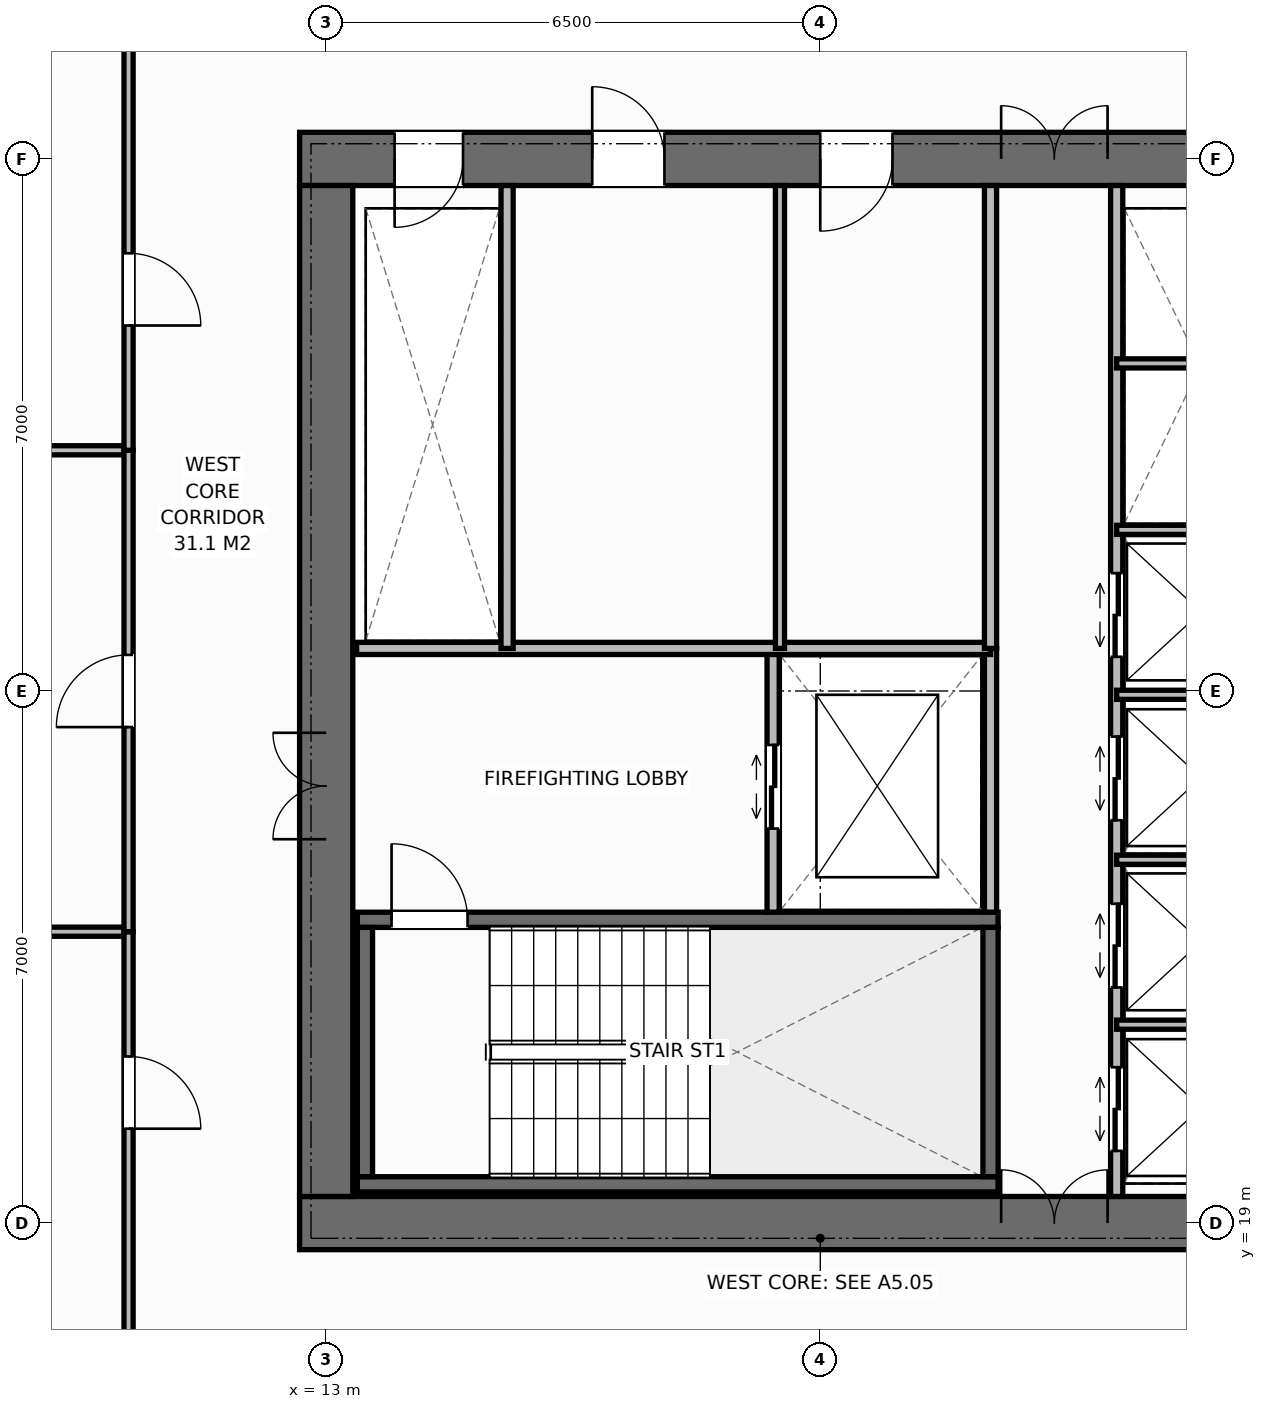
"""IFC4 building model, lengths in metres.
Left out: names, types, materials, properties, quantities, classifications, styles, units other than length and angle.
Written with IfcOpenShell. Run it as: python <this file> out.ifc"""

import sys

from ifc_helpers import new_model, si_unit, direction, frame, frame_2d, origin, place, context, subcontext, project, spatial, rectangle, extrude, element, fill, save


model = new_model("IFC4")
c1 = context("Model", 3, precision=1e-05, world=origin(), true_north=direction((0.0, 1.0)))
c2 = subcontext(c1, "Body", "Model", "MODEL_VIEW")
j1 = project(units=[si_unit("LENGTHUNIT", "METRE"), si_unit("PLANEANGLEUNIT", "RADIAN")], contexts=[c1])
p1 = place(None, origin())
s1 = spatial("IfcSite", under=j1, at=p1, CompositionType="ELEMENT")
p2 = place(p1, origin())
s2 = spatial("IfcBuilding", under=s1, at=p2, CompositionType="ELEMENT")
p3 = place(p2, frame((0.0, 0.0, 86.0)))
s3 = spatial("IfcBuildingStorey", under=s2, at=p3, CompositionType="ELEMENT", Elevation=86.0)
p4 = place(p3, frame((12.65, 19.0, 0.0), z_axis=(0.0, 0.0, 1.0), x_axis=(1.0, 0.0, 0.0)))
e1 = element("IfcWall", 1, at=p4, inside=s3, PredefinedType="SHEAR", context=c2, shape_type="SweptSolid", body=[
    extrude(rectangle(XDim=13.7, YDim=0.7, at=frame_2d((6.85, 0.0))), origin(), (0.0, 0.0, 1.0), 3.8),
])
p5 = place(p4, frame((9.23, 0.0, 0.0)))
e2 = element("IfcOpeningElement", 2, at=p5, cuts=e1, PredefinedType="OPENING", context=c2, shape_type="SweptSolid", body=[
    extrude(rectangle(XDim=1.4, YDim=2.2, at=frame_2d((0.7, 1.1))), frame((0.0, 0.36, 0.0), z_axis=(0.0, -1.0, 0.0), x_axis=(1.0, 0.0, 0.0)), (0.0, 0.0, 1.0), 0.72),
])
p6 = place(p3, frame((12.65, 33.0, 0.0), z_axis=(0.0, 0.0, 1.0), x_axis=(1.0, 0.0, 0.0)))
e3 = element("IfcWall", 3, at=p6, inside=s3, PredefinedType="SHEAR", context=c2, shape_type="SweptSolid", body=[
    extrude(rectangle(XDim=13.7, YDim=0.7, at=frame_2d((6.85, 0.0))), origin(), (0.0, 0.0, 1.0), 3.8),
])
p7 = place(p6, frame((1.25, 0.0, 0.0)))
e4 = element("IfcOpeningElement", 4, at=p7, cuts=e3, PredefinedType="OPENING", context=c2, shape_type="SweptSolid", body=[
    extrude(rectangle(XDim=0.9, YDim=2.15, at=frame_2d((0.45, 1.075))), frame((0.0, 0.36, 0.0), z_axis=(0.0, -1.0, 0.0), x_axis=(1.0, 0.0, 0.0)), (0.0, 0.0, 1.0), 0.72),
])
p8 = place(p6, frame((3.85, 0.0, 0.0)))
e5 = element("IfcOpeningElement", 5, at=p8, cuts=e3, PredefinedType="OPENING", context=c2, shape_type="SweptSolid", body=[
    extrude(rectangle(XDim=0.95, YDim=2.15, at=frame_2d((0.475, 1.075))), frame((0.0, 0.36, 0.0), z_axis=(0.0, -1.0, 0.0), x_axis=(1.0, 0.0, 0.0)), (0.0, 0.0, 1.0), 0.72),
])
p9 = place(p6, frame((6.85, 0.0, 0.0)))
e6 = element("IfcOpeningElement", 6, at=p9, cuts=e3, PredefinedType="OPENING", context=c2, shape_type="SweptSolid", body=[
    extrude(rectangle(XDim=0.95, YDim=2.15, at=frame_2d((0.475, 1.075))), frame((0.0, 0.36, 0.0), z_axis=(0.0, -1.0, 0.0), x_axis=(1.0, 0.0, 0.0)), (0.0, 0.0, 1.0), 0.72),
])
p10 = place(p6, frame((9.23, 0.0, 0.0)))
e7 = element("IfcOpeningElement", 7, at=p10, cuts=e3, PredefinedType="OPENING", context=c2, shape_type="SweptSolid", body=[
    extrude(rectangle(XDim=1.4, YDim=2.2, at=frame_2d((0.7, 1.1))), frame((0.0, 0.36, 0.0), z_axis=(0.0, -1.0, 0.0), x_axis=(1.0, 0.0, 0.0)), (0.0, 0.0, 1.0), 0.72),
])
p11 = place(p3, frame((13.0, 19.35, 0.0), z_axis=(0.0, 0.0, 1.0), x_axis=(0.0, 1.0, 0.0)))
e8 = element("IfcWall", 8, at=p11, inside=s3, PredefinedType="SHEAR", context=c2, shape_type="SweptSolid", body=[
    extrude(rectangle(XDim=13.3, YDim=0.7, at=frame_2d((6.65, 0.0))), origin(), (0.0, 0.0, 1.0), 3.8),
])
p12 = place(p11, frame((4.7, 0.0, 0.0)))
e9 = element("IfcOpeningElement", 9, at=p12, cuts=e8, PredefinedType="OPENING", context=c2, shape_type="SweptSolid", body=[
    extrude(rectangle(XDim=1.4, YDim=2.2, at=frame_2d((0.7, 1.1))), frame((0.0, 0.36, 0.0), z_axis=(0.0, -1.0, 0.0), x_axis=(1.0, 0.0, 0.0)), (0.0, 0.0, 1.0), 0.72),
])
p13 = place(p3, frame((13.41, 19.51, 0.0), z_axis=(0.0, 0.0, 1.0), x_axis=(1.0, 0.0, 0.0)))
e10 = element("IfcWall", 10, at=p13, inside=s3, PredefinedType="SHEAR", context=c2, shape_type="SweptSolid", body=[
    extrude(rectangle(XDim=8.43, YDim=0.2, at=frame_2d((4.215, 0.0))), origin(), (0.0, 0.0, 1.0), 3.8),
])
p14 = place(p3, frame((13.41, 22.99, 0.0), z_axis=(0.0, 0.0, 1.0), x_axis=(1.0, 0.0, 0.0)))
e11 = element("IfcWall", 11, at=p14, inside=s3, PredefinedType="SHEAR", context=c2, shape_type="SweptSolid", body=[
    extrude(rectangle(XDim=8.43, YDim=0.2, at=frame_2d((4.215, 0.0))), origin(), (0.0, 0.0, 1.0), 3.8),
])
p15 = place(p14, frame((0.45, 0.0, 0.0)))
e12 = element("IfcOpeningElement", 12, at=p15, cuts=e11, PredefinedType="OPENING", context=c2, shape_type="SweptSolid", body=[
    extrude(rectangle(XDim=1.0, YDim=2.15, at=frame_2d((0.5, 1.075))), frame((0.0, 0.11, 0.0), z_axis=(0.0, -1.0, 0.0), x_axis=(1.0, 0.0, 0.0)), (0.0, 0.0, 1.0), 0.22),
])
for number, where, z_axis, x_axis in (
    (13, (13.51, 19.61, 0.0), (0.0, 0.0, 1.0), (0.0, 1.0, 0.0)),
    (14, (21.74, 19.61, 0.0), (0.0, 0.0, 1.0), (0.0, 1.0, 0.0)),
):
    element("IfcWall", number, at=place(p3, frame(where, z_axis=z_axis, x_axis=x_axis)), inside=s3, PredefinedType="SHEAR", context=c2, shape_type="SweptSolid", body=[
        extrude(rectangle(XDim=3.28, YDim=0.2, at=frame_2d((1.64, 0.0))), origin(), (0.0, 0.0, 1.0), 3.8),
    ])
p16 = place(p3, frame((21.74, 23.09, 0.0), z_axis=(0.0, 0.0, 1.0), x_axis=(0.0, 1.0, 0.0)))
e15 = element("IfcWall", 15, at=p16, inside=s3, PredefinedType="STANDARD", context=c2, shape_type="SweptSolid", body=[
    extrude(rectangle(XDim=3.47, YDim=0.16, at=frame_2d((1.735, 0.0))), origin(), (0.0, 0.0, 1.0), 3.565),
])
p17 = place(p3, frame((18.88, 23.09, 0.0), z_axis=(0.0, 0.0, 1.0), x_axis=(0.0, 1.0, 0.0)))
e16 = element("IfcWall", 16, at=p17, inside=s3, PredefinedType="STANDARD", context=c2, shape_type="SweptSolid", body=[
    extrude(rectangle(XDim=3.47, YDim=0.16, at=frame_2d((1.735, 0.0))), origin(), (0.0, 0.0, 1.0), 3.565),
])
p18 = place(p17, frame((1.1, 0.0, 0.0)))
e17 = element("IfcOpeningElement", 17, at=p18, cuts=e16, PredefinedType="OPENING", context=c2, shape_type="SweptSolid", body=[
    extrude(rectangle(XDim=1.1, YDim=2.2, at=frame_2d((0.55, 1.1))), frame((0.0, 0.09, 0.0), z_axis=(0.0, -1.0, 0.0), x_axis=(1.0, 0.0, 0.0)), (0.0, 0.0, 1.0), 0.18),
])
p19 = place(p3, frame((13.4, 26.56, 0.0), z_axis=(0.0, 0.0, 1.0), x_axis=(1.0, 0.0, 0.0)))
e18 = element("IfcWall", 18, at=p19, inside=s3, PredefinedType="STANDARD", context=c2, shape_type="SweptSolid", body=[
    extrude(rectangle(XDim=8.34, YDim=0.16, at=frame_2d((4.17, 0.0))), origin(), (0.0, 0.0, 1.0), 3.565),
])
p20 = place(p3, frame((15.38, 26.56, 0.0), z_axis=(0.0, 0.0, 1.0), x_axis=(0.0, 1.0, 0.0)))
e19 = element("IfcWall", 19, at=p20, inside=s3, PredefinedType="STANDARD", context=c2, shape_type="SweptSolid", body=[
    extrude(rectangle(XDim=6.09, YDim=0.16, at=frame_2d((3.045, 0.0))), origin(), (0.0, 0.0, 1.0), 3.565),
])
p21 = place(p3, frame((18.97, 26.56, 0.0), z_axis=(0.0, 0.0, 1.0), x_axis=(0.0, 1.0, 0.0)))
e20 = element("IfcWall", 20, at=p21, inside=s3, PredefinedType="PARTITIONING", context=c2, shape_type="SweptSolid", body=[
    extrude(rectangle(XDim=6.09, YDim=0.12, at=frame_2d((3.045, 0.0))), origin(), (0.0, 0.0, 1.0), 3.565),
])
p22 = place(p3, frame((21.74, 26.56, 0.0), z_axis=(0.0, 0.0, 1.0), x_axis=(0.0, 1.0, 0.0)))
e21 = element("IfcWall", 21, at=p22, inside=s3, PredefinedType="STANDARD", context=c2, shape_type="SweptSolid", body=[
    extrude(rectangle(XDim=6.09, YDim=0.16, at=frame_2d((3.045, 0.0))), origin(), (0.0, 0.0, 1.0), 3.565),
])
p23 = place(p3, frame((23.4, 19.35, 0.0), z_axis=(0.0, 0.0, 1.0), x_axis=(0.0, 1.0, 0.0)))
e22 = element("IfcWall", 22, at=p23, inside=s3, PredefinedType="STANDARD", context=c2, shape_type="SweptSolid", body=[
    extrude(rectangle(XDim=13.3, YDim=0.16, at=frame_2d((6.65, 0.0))), origin(), (0.0, 0.0, 1.0), 3.565),
])
p24 = place(p23, frame((0.6, 0.0, 0.0)))
e23 = element("IfcOpeningElement", 23, at=p24, cuts=e22, PredefinedType="OPENING", context=c2, shape_type="SweptSolid", body=[
    extrude(rectangle(XDim=1.1, YDim=2.2, at=frame_2d((0.55, 1.1))), frame((0.0, 0.09, 0.0), z_axis=(0.0, -1.0, 0.0), x_axis=(1.0, 0.0, 0.0)), (0.0, 0.0, 1.0), 0.18),
])
p25 = place(p23, frame((2.75, 0.0, 0.0)))
e24 = element("IfcOpeningElement", 24, at=p25, cuts=e22, PredefinedType="OPENING", context=c2, shape_type="SweptSolid", body=[
    extrude(rectangle(XDim=1.1, YDim=2.2, at=frame_2d((0.55, 1.1))), frame((0.0, 0.09, 0.0), z_axis=(0.0, -1.0, 0.0), x_axis=(1.0, 0.0, 0.0)), (0.0, 0.0, 1.0), 0.18),
])
p26 = place(p23, frame((4.95, 0.0, 0.0)))
e25 = element("IfcOpeningElement", 25, at=p26, cuts=e22, PredefinedType="OPENING", context=c2, shape_type="SweptSolid", body=[
    extrude(rectangle(XDim=1.1, YDim=2.2, at=frame_2d((0.55, 1.1))), frame((0.0, 0.09, 0.0), z_axis=(0.0, -1.0, 0.0), x_axis=(1.0, 0.0, 0.0)), (0.0, 0.0, 1.0), 0.18),
])
p27 = place(p23, frame((7.1, 0.0, 0.0)))
e26 = element("IfcOpeningElement", 26, at=p27, cuts=e22, PredefinedType="OPENING", context=c2, shape_type="SweptSolid", body=[
    extrude(rectangle(XDim=1.1, YDim=2.2, at=frame_2d((0.55, 1.1))), frame((0.0, 0.09, 0.0), z_axis=(0.0, -1.0, 0.0), x_axis=(1.0, 0.0, 0.0)), (0.0, 0.0, 1.0), 0.18),
])
for number, where, z_axis, x_axis in (
    (27, (23.4, 21.61, 0.0), (0.0, 0.0, 1.0), (1.0, 0.0, 0.0)),
    (28, (23.4, 23.78, 0.0), (0.0, 0.0, 1.0), (1.0, 0.0, 0.0)),
    (29, (23.4, 25.95, 0.0), (0.0, 0.0, 1.0), (1.0, 0.0, 0.0)),
    (30, (23.4, 28.12, 0.0), (0.0, 0.0, 1.0), (1.0, 0.0, 0.0)),
    (31, (23.4, 30.31, 0.0), (0.0, 0.0, 1.0), (1.0, 0.0, 0.0)),
):
    element("IfcWall", number, at=place(p3, frame(where, z_axis=z_axis, x_axis=x_axis)), inside=s3, PredefinedType="PARTITIONING", context=c2, shape_type="SweptSolid", body=[
        extrude(rectangle(XDim=2.2, YDim=0.12, at=frame_2d((1.1, 0.0))), origin(), (0.0, 0.0, 1.0), 3.565),
    ])
p28 = place(p3, frame((1.82, 22.833, 0.0), z_axis=(0.0, 0.0, 1.0), x_axis=(1.0, 0.0, 0.0)))
e32 = element("IfcWall", 32, at=p28, inside=s3, PredefinedType="PARTITIONING", context=c2, shape_type="SweptSolid", body=[
    extrude(rectangle(XDim=8.58, YDim=0.12, at=frame_2d((4.29, 0.0))), origin(), (0.0, 0.0, 1.0), 3.565),
])
p29 = place(p3, frame((10.4, 16.5, 0.0), z_axis=(0.0, 0.0, 1.0), x_axis=(0.0, 1.0, 0.0)))
e33 = element("IfcWall", 33, at=p29, inside=s3, PredefinedType="PARTITIONING", context=c2, shape_type="SweptSolid", body=[
    extrude(rectangle(XDim=6.333, YDim=0.12, at=frame_2d((3.167, 0.0))), origin(), (0.0, 0.0, 1.0), 3.565),
])
p30 = place(p29, frame((3.742, 0.0, 0.0)))
e34 = element("IfcOpeningElement", 34, at=p30, cuts=e33, PredefinedType="OPENING", context=c2, shape_type="SweptSolid", body=[
    extrude(rectangle(XDim=0.95, YDim=2.15, at=frame_2d((0.475, 1.075))), frame((0.0, 0.07, 0.0), z_axis=(0.0, -1.0, 0.0), x_axis=(1.0, 0.0, 0.0)), (0.0, 0.0, 1.0), 0.14),
])
p31 = place(p3, frame((1.82, 29.167, 0.0), z_axis=(0.0, 0.0, 1.0), x_axis=(1.0, 0.0, 0.0)))
e35 = element("IfcWall", 35, at=p31, inside=s3, PredefinedType="PARTITIONING", context=c2, shape_type="SweptSolid", body=[
    extrude(rectangle(XDim=8.58, YDim=0.12, at=frame_2d((4.29, 0.0))), origin(), (0.0, 0.0, 1.0), 3.565),
])
p32 = place(p3, frame((10.4, 22.833, 0.0), z_axis=(0.0, 0.0, 1.0), x_axis=(0.0, 1.0, 0.0)))
e36 = element("IfcWall", 36, at=p32, inside=s3, PredefinedType="PARTITIONING", context=c2, shape_type="SweptSolid", body=[
    extrude(rectangle(XDim=6.333, YDim=0.12, at=frame_2d((3.167, 0.0))), origin(), (0.0, 0.0, 1.0), 3.565),
])
p33 = place(p32, frame((2.692, 0.0, 0.0)))
e37 = element("IfcOpeningElement", 37, at=p33, cuts=e36, PredefinedType="OPENING", context=c2, shape_type="SweptSolid", body=[
    extrude(rectangle(XDim=0.95, YDim=2.15, at=frame_2d((0.475, 1.075))), frame((0.0, 0.07, 0.0), z_axis=(0.0, -1.0, 0.0), x_axis=(1.0, 0.0, 0.0)), (0.0, 0.0, 1.0), 0.14),
])
p34 = place(p3, frame((10.4, 29.167, 0.0), z_axis=(0.0, 0.0, 1.0), x_axis=(0.0, 1.0, 0.0)))
e38 = element("IfcWall", 38, at=p34, inside=s3, PredefinedType="PARTITIONING", context=c2, shape_type="SweptSolid", body=[
    extrude(rectangle(XDim=6.333, YDim=0.12, at=frame_2d((3.167, 0.0))), origin(), (0.0, 0.0, 1.0), 3.565),
])
p35 = place(p34, frame((1.642, 0.0, 0.0)))
e39 = element("IfcOpeningElement", 39, at=p35, cuts=e38, PredefinedType="OPENING", context=c2, shape_type="SweptSolid", body=[
    extrude(rectangle(XDim=0.95, YDim=2.15, at=frame_2d((0.475, 1.075))), frame((0.0, 0.07, 0.0), z_axis=(0.0, -1.0, 0.0), x_axis=(1.0, 0.0, 0.0)), (0.0, 0.0, 1.0), 0.14),
])
p36 = place(p15, origin())
e40 = element("IfcDoor", 40, at=p36, inside=s3, OperationType="SINGLE_SWING_LEFT", PredefinedType="DOOR", context=c2, shape_type="SweptSolid", body=[
    extrude(rectangle(XDim=1.0, YDim=2.15, at=frame_2d((0.5, 1.075))), frame((0.0, 0.025, 0.0), z_axis=(0.0, -1.0, 0.0), x_axis=(1.0, 0.0, 0.0)), (0.0, 0.0, 1.0), 0.05),
])
fill(e12, e40)
p37 = place(p12, origin())
e41 = element("IfcDoor", 41, at=p37, inside=s3, OperationType="DOUBLE_DOOR_SINGLE_SWING", PredefinedType="DOOR", context=c2, shape_type="SweptSolid", body=[
    extrude(rectangle(XDim=1.4, YDim=2.2, at=frame_2d((0.7, 1.1))), frame((0.0, 0.025, 0.0), z_axis=(0.0, -1.0, 0.0), x_axis=(1.0, 0.0, 0.0)), (0.0, 0.0, 1.0), 0.05),
])
fill(e9, e41)
p38 = place(p18, origin())
e42 = element("IfcDoor", 42, at=p38, inside=s3, OperationType="DOUBLE_DOOR_SLIDING", PredefinedType="DOOR", context=c2, shape_type="SweptSolid", body=[
    extrude(rectangle(XDim=1.1, YDim=2.2, at=frame_2d((0.55, 1.1))), frame((0.0, 0.025, 0.0), z_axis=(0.0, -1.0, 0.0), x_axis=(1.0, 0.0, 0.0)), (0.0, 0.0, 1.0), 0.05),
])
fill(e17, e42)
p39 = place(p7, origin())
e43 = element("IfcDoor", 43, at=p39, inside=s3, OperationType="SINGLE_SWING_RIGHT", PredefinedType="DOOR", context=c2, shape_type="SweptSolid", body=[
    extrude(rectangle(XDim=0.9, YDim=2.15, at=frame_2d((0.45, 1.075))), frame((0.0, -0.075, 0.0), z_axis=(0.0, -1.0, 0.0), x_axis=(1.0, 0.0, 0.0)), (0.0, 0.0, 1.0), 0.05),
])
fill(e4, e43)
p40 = place(p8, origin())
e44 = element("IfcDoor", 44, at=p40, inside=s3, OperationType="SINGLE_SWING_LEFT", PredefinedType="DOOR", context=c2, shape_type="SweptSolid", body=[
    extrude(rectangle(XDim=0.95, YDim=2.15, at=frame_2d((0.475, 1.075))), frame((0.0, -0.075, 0.0), z_axis=(0.0, -1.0, 0.0), x_axis=(1.0, 0.0, 0.0)), (0.0, 0.0, 1.0), 0.05),
])
fill(e5, e44)
p41 = place(p9, origin())
e45 = element("IfcDoor", 45, at=p41, inside=s3, OperationType="SINGLE_SWING_RIGHT", PredefinedType="DOOR", context=c2, shape_type="SweptSolid", body=[
    extrude(rectangle(XDim=0.95, YDim=2.15, at=frame_2d((0.475, 1.075))), frame((0.0, -0.075, 0.0), z_axis=(0.0, -1.0, 0.0), x_axis=(1.0, 0.0, 0.0)), (0.0, 0.0, 1.0), 0.05),
])
fill(e6, e45)
p42 = place(p5, origin())
e46 = element("IfcDoor", 46, at=p42, inside=s3, OperationType="DOUBLE_DOOR_SINGLE_SWING", PredefinedType="DOOR", context=c2, shape_type="SweptSolid", body=[
    extrude(rectangle(XDim=1.4, YDim=2.2, at=frame_2d((0.7, 1.1))), frame((0.0, 0.125, 0.0), z_axis=(0.0, -1.0, 0.0), x_axis=(1.0, 0.0, 0.0)), (0.0, 0.0, 1.0), 0.05),
])
fill(e2, e46)
p43 = place(p10, origin())
e47 = element("IfcDoor", 47, at=p43, inside=s3, OperationType="DOUBLE_DOOR_SINGLE_SWING", PredefinedType="DOOR", context=c2, shape_type="SweptSolid", body=[
    extrude(rectangle(XDim=1.4, YDim=2.2, at=frame_2d((0.7, 1.1))), frame((0.0, -0.075, 0.0), z_axis=(0.0, -1.0, 0.0), x_axis=(1.0, 0.0, 0.0)), (0.0, 0.0, 1.0), 0.05),
])
fill(e7, e47)
p44 = place(p24, origin())
e48 = element("IfcDoor", 48, at=p44, inside=s3, OperationType="DOUBLE_DOOR_SLIDING", PredefinedType="DOOR", context=c2, shape_type="SweptSolid", body=[
    extrude(rectangle(XDim=1.1, YDim=2.2, at=frame_2d((0.55, 1.1))), frame((0.0, 0.025, 0.0), z_axis=(0.0, -1.0, 0.0), x_axis=(1.0, 0.0, 0.0)), (0.0, 0.0, 1.0), 0.05),
])
fill(e23, e48)
p45 = place(p25, origin())
e49 = element("IfcDoor", 49, at=p45, inside=s3, OperationType="DOUBLE_DOOR_SLIDING", PredefinedType="DOOR", context=c2, shape_type="SweptSolid", body=[
    extrude(rectangle(XDim=1.1, YDim=2.2, at=frame_2d((0.55, 1.1))), frame((0.0, 0.025, 0.0), z_axis=(0.0, -1.0, 0.0), x_axis=(1.0, 0.0, 0.0)), (0.0, 0.0, 1.0), 0.05),
])
fill(e24, e49)
p46 = place(p26, origin())
e50 = element("IfcDoor", 50, at=p46, inside=s3, OperationType="DOUBLE_DOOR_SLIDING", PredefinedType="DOOR", context=c2, shape_type="SweptSolid", body=[
    extrude(rectangle(XDim=1.1, YDim=2.2, at=frame_2d((0.55, 1.1))), frame((0.0, 0.025, 0.0), z_axis=(0.0, -1.0, 0.0), x_axis=(1.0, 0.0, 0.0)), (0.0, 0.0, 1.0), 0.05),
])
fill(e25, e50)
p47 = place(p27, origin())
e51 = element("IfcDoor", 51, at=p47, inside=s3, OperationType="DOUBLE_DOOR_SLIDING", PredefinedType="DOOR", context=c2, shape_type="SweptSolid", body=[
    extrude(rectangle(XDim=1.1, YDim=2.2, at=frame_2d((0.55, 1.1))), frame((0.0, 0.025, 0.0), z_axis=(0.0, -1.0, 0.0), x_axis=(1.0, 0.0, 0.0)), (0.0, 0.0, 1.0), 0.05),
])
fill(e26, e51)
p48 = place(p30, origin())
e52 = element("IfcDoor", 52, at=p48, inside=s3, OperationType="SINGLE_SWING_RIGHT", PredefinedType="DOOR", context=c2, shape_type="SweptSolid", body=[
    extrude(rectangle(XDim=0.95, YDim=2.15, at=frame_2d((0.475, 1.075))), frame((0.0, 0.025, 0.0), z_axis=(0.0, -1.0, 0.0), x_axis=(1.0, 0.0, 0.0)), (0.0, 0.0, 1.0), 0.05),
])
fill(e34, e52)
p49 = place(p33, origin())
e53 = element("IfcDoor", 53, at=p49, inside=s3, OperationType="SINGLE_SWING_LEFT", PredefinedType="DOOR", context=c2, shape_type="SweptSolid", body=[
    extrude(rectangle(XDim=0.95, YDim=2.15, at=frame_2d((0.475, 1.075))), frame((0.0, 0.025, 0.0), z_axis=(0.0, -1.0, 0.0), x_axis=(1.0, 0.0, 0.0)), (0.0, 0.0, 1.0), 0.05),
])
fill(e37, e53)
p50 = place(p35, origin())
e54 = element("IfcDoor", 54, at=p50, inside=s3, OperationType="SINGLE_SWING_RIGHT", PredefinedType="DOOR", context=c2, shape_type="SweptSolid", body=[
    extrude(rectangle(XDim=0.95, YDim=2.15, at=frame_2d((0.475, 1.075))), frame((0.0, 0.025, 0.0), z_axis=(0.0, -1.0, 0.0), x_axis=(1.0, 0.0, 0.0)), (0.0, 0.0, 1.0), 0.05),
])
fill(e39, e54)
save(model, sys.argv[1])
